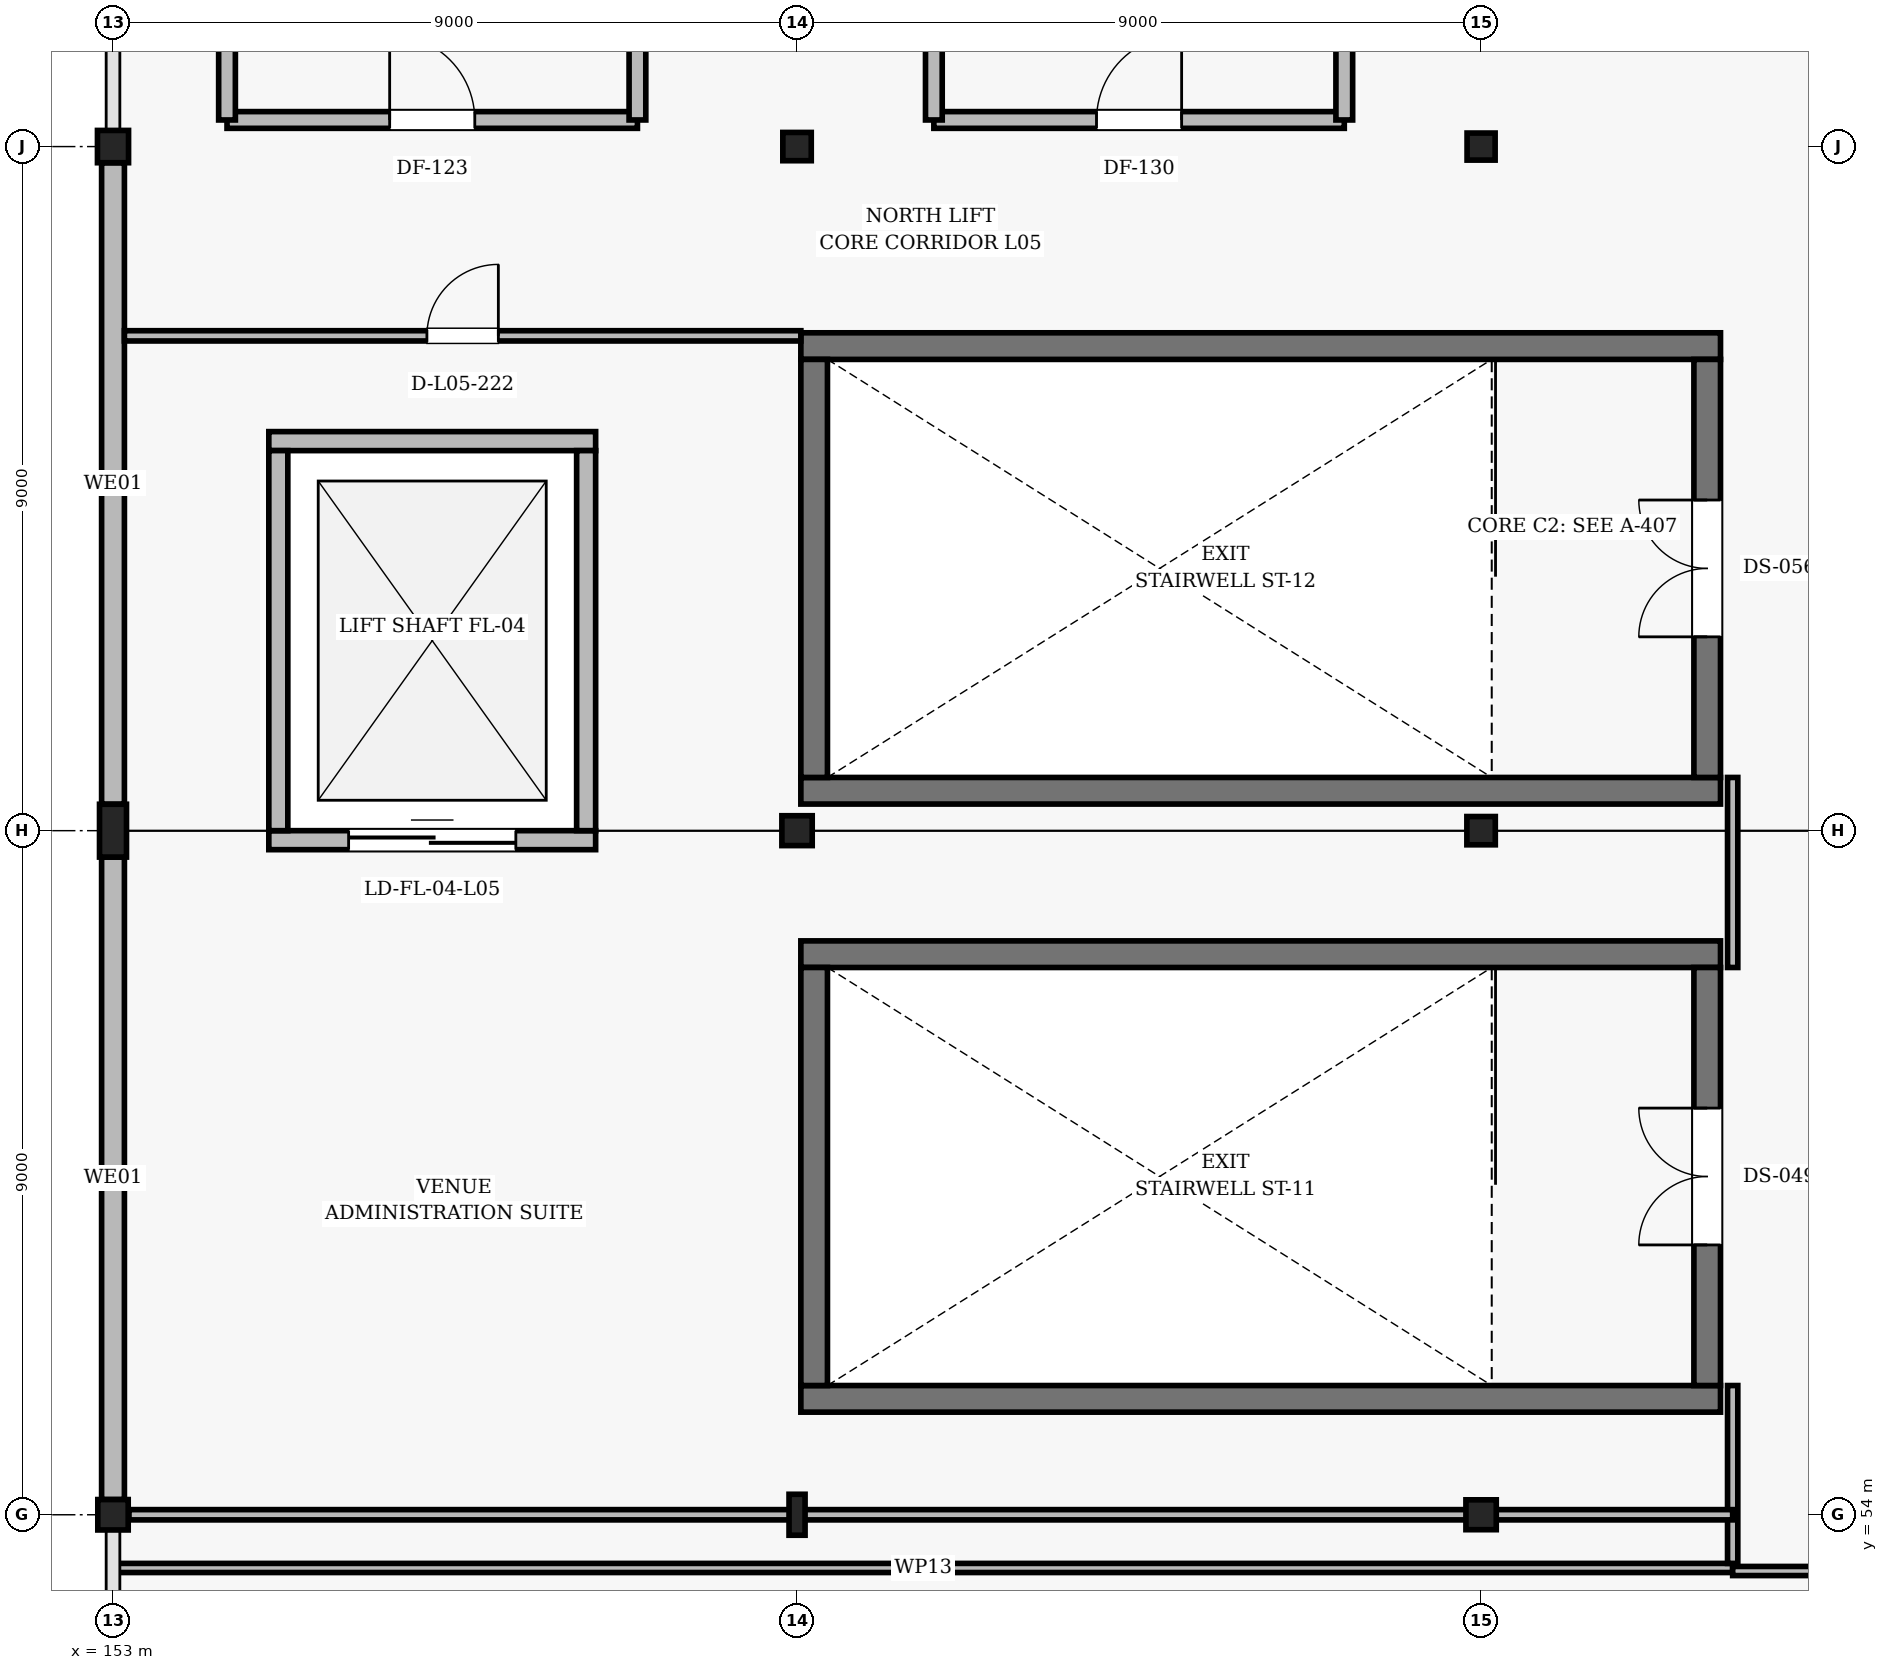
"""IFC4 building model, lengths in metres.
Left out: names, types, materials, properties, quantities, classifications, styles, units other than length and angle.
Written with IfcOpenShell. Run it as: python <this file> out.ifc"""

import sys

from ifc_helpers import new_model, si_unit, direction, frame, frame_2d, origin, origin_2d, place, context, subcontext, project, spatial, rectangle, hollow_rectangle, i_section, extrude, element, fill, save


model = new_model("IFC4")
c1 = context("Model", 3, precision=1e-05, world=origin(), true_north=direction((0.0, 1.0)))
c2 = subcontext(c1, "Body", "Model", "MODEL_VIEW")
j1 = project(units=[si_unit("LENGTHUNIT", "METRE"), si_unit("PLANEANGLEUNIT", "RADIAN")], contexts=[c1])
p1 = place(None, origin())
s1 = spatial("IfcSite", under=j1, at=p1, CompositionType="ELEMENT")
p2 = place(p1, origin())
s2 = spatial("IfcBuilding", under=s1, at=p2, CompositionType="ELEMENT")
p3 = place(p2, frame((0.0, 0.0, 25.2)))
s3 = spatial("IfcBuildingStorey", under=s2, at=p3, CompositionType="ELEMENT", Elevation=25.2)
p4 = place(p3, frame((153.0, 54.0, 0.0), z_axis=(0.0, 0.0, 1.0), x_axis=(1.0, 0.0, 0.0)))
e1 = element("IfcColumn", 1, at=p4, inside=s3, PredefinedType="COLUMN", context=c2, shape_type="SweptSolid", body=[
    extrude(hollow_rectangle(XDim=0.4, YDim=0.4, WallThickness=0.016, InnerFilletRadius=0.016, OuterFilletRadius=0.032, at=origin_2d()), origin(), (0.0, 0.0, 1.0), 4.8),
])
p5 = place(p3, frame((153.0, 63.0, 0.0), z_axis=(0.0, 0.0, 1.0), x_axis=(1.0, 0.0, 0.0)))
e2 = element("IfcColumn", 2, at=p5, inside=s3, PredefinedType="COLUMN", context=c2, shape_type="SweptSolid", body=[
    extrude(i_section(OverallWidth=0.355, OverallDepth=0.695, WebThickness=0.015, FlangeThickness=0.025, FilletRadius=0.018, at=origin_2d()), origin(), (0.0, 0.0, 1.0), 4.595),
])
p6 = place(p3, frame((153.0, 72.0, 0.0), z_axis=(0.0, 0.0, 1.0), x_axis=(1.0, 0.0, 0.0)))
e3 = element("IfcColumn", 3, at=p6, inside=s3, PredefinedType="COLUMN", context=c2, shape_type="SweptSolid", body=[
    extrude(i_section(OverallWidth=0.409, OverallDepth=0.425, WebThickness=0.031, FlangeThickness=0.049, FilletRadius=0.02, at=origin_2d()), origin(), (0.0, 0.0, 1.0), 4.595),
])
p7 = place(p3, frame((162.0, 54.0, 0.0), z_axis=(0.0, 0.0, 1.0), x_axis=(1.0, 0.0, 0.0)))
e4 = element("IfcColumn", 4, at=p7, inside=s3, PredefinedType="COLUMN", context=c2, shape_type="SweptSolid", body=[
    extrude(i_section(OverallWidth=0.211, OverallDepth=0.539, WebThickness=0.012, FlangeThickness=0.019, FilletRadius=0.014, at=origin_2d()), origin(), (0.0, 0.0, 1.0), 4.8),
])
p8 = place(p3, frame((162.0, 63.0, 0.0), z_axis=(0.0, 0.0, 1.0), x_axis=(1.0, 0.0, 0.0)))
e5 = element("IfcColumn", 5, at=p8, inside=s3, PredefinedType="COLUMN", context=c2, shape_type="SweptSolid", body=[
    extrude(i_section(OverallWidth=0.399, OverallDepth=0.393, WebThickness=0.023, FlangeThickness=0.037, FilletRadius=0.018, at=origin_2d()), origin(), (0.0, 0.0, 1.0), 4.595),
])
p9 = place(p3, frame((162.0, 72.0, 0.0), z_axis=(0.0, 0.0, 1.0), x_axis=(1.0, 0.0, 0.0)))
e6 = element("IfcColumn", 6, at=p9, inside=s3, PredefinedType="COLUMN", context=c2, shape_type="SweptSolid", body=[
    extrude(i_section(OverallWidth=0.374, OverallDepth=0.372, WebThickness=0.016, FlangeThickness=0.026, FilletRadius=0.016, at=origin_2d()), origin(), (0.0, 0.0, 1.0), 4.595),
])
p10 = place(p3, frame((171.0, 54.0, 0.0), z_axis=(0.0, 0.0, 1.0), x_axis=(1.0, 0.0, 0.0)))
e7 = element("IfcColumn", 7, at=p10, inside=s3, PredefinedType="COLUMN", context=c2, shape_type="SweptSolid", body=[
    extrude(i_section(OverallWidth=0.399, OverallDepth=0.393, WebThickness=0.023, FlangeThickness=0.037, FilletRadius=0.018, at=origin_2d()), origin(), (0.0, 0.0, 1.0), 4.8),
])
p11 = place(p3, frame((171.0, 63.0, 0.0), z_axis=(0.0, 0.0, 1.0), x_axis=(1.0, 0.0, 0.0)))
e8 = element("IfcColumn", 8, at=p11, inside=s3, PredefinedType="COLUMN", context=c2, shape_type="SweptSolid", body=[
    extrude(i_section(OverallWidth=0.374, OverallDepth=0.372, WebThickness=0.016, FlangeThickness=0.026, FilletRadius=0.016, at=origin_2d()), origin(), (0.0, 0.0, 1.0), 4.595),
])
p12 = place(p3, frame((171.0, 72.0, 0.0), z_axis=(0.0, 0.0, 1.0), x_axis=(1.0, 0.0, 0.0)))
e9 = element("IfcColumn", 9, at=p12, inside=s3, PredefinedType="COLUMN", context=c2, shape_type="SweptSolid", body=[
    extrude(i_section(OverallWidth=0.369, OverallDepth=0.356, WebThickness=0.011, FlangeThickness=0.018, FilletRadius=0.015, at=origin_2d()), origin(), (0.0, 0.0, 1.0), 4.595),
])
p13 = place(p3, frame((153.0, 54.2, 0.0), z_axis=(0.0, 0.0, 1.0), x_axis=(0.0, 1.0, 0.0)))
e10 = element("IfcWall", 10, at=p13, inside=s3, PredefinedType="SOLIDWALL", context=c2, shape_type="SweptSolid", body=[
    extrude(rectangle(XDim=8.453, YDim=0.3, at=frame_2d((4.226, 0.0))), origin(), (0.0, 0.0, 1.0), 4.09),
])
p14 = place(p3, frame((153.0, 63.347, 0.0), z_axis=(0.0, 0.0, 1.0), x_axis=(0.0, 1.0, 0.0)))
e11 = element("IfcWall", 11, at=p14, inside=s3, PredefinedType="SOLIDWALL", context=c2, shape_type="SweptSolid", body=[
    extrude(rectangle(XDim=8.44, YDim=0.3, at=frame_2d((4.22, 0.0))), origin(), (0.0, 0.0, 1.0), 3.896),
])
for number, where, z_axis, x_axis in (
    (12, (162.05, 55.525, 0.0), (0.0, 0.0, 1.0), (1.0, 0.0, 0.0)),
    (13, (174.15, 61.375, 0.0), (0.0, 0.0, 1.0), (-1.0, 0.0, 0.0)),
):
    element("IfcWall", number, at=place(p3, frame(where, z_axis=z_axis, x_axis=x_axis)), inside=s3, PredefinedType="SHEAR", context=c2, shape_type="SweptSolid", body=[
        extrude(rectangle(XDim=12.1, YDim=0.35, at=frame_2d((6.05, 0.0))), origin(), (0.0, 0.0, 1.0), 4.8),
    ])
p15 = place(p3, frame((162.225, 61.2, 0.0), z_axis=(0.0, 0.0, 1.0), x_axis=(0.0, -1.0, 0.0)))
e14 = element("IfcWall", 14, at=p15, inside=s3, PredefinedType="SHEAR", context=c2, shape_type="SweptSolid", body=[
    extrude(rectangle(XDim=5.5, YDim=0.35, at=frame_2d((2.75, 0.0))), origin(), (0.0, 0.0, 1.0), 4.8),
])
p16 = place(p3, frame((173.975, 55.7, 0.0), z_axis=(0.0, 0.0, 1.0), x_axis=(0.0, 1.0, 0.0)))
e15 = element("IfcWall", 15, at=p16, inside=s3, PredefinedType="SHEAR", context=c2, shape_type="SweptSolid", body=[
    extrude(rectangle(XDim=5.5, YDim=0.35, at=frame_2d((2.75, 0.0))), origin(), (0.0, 0.0, 1.0), 4.8),
])
p17 = place(p16, frame((1.85, 0.0, 0.0)))
e16 = element("IfcOpeningElement", 16, at=p17, cuts=e15, PredefinedType="OPENING", context=c2, shape_type="SweptSolid", body=[
    extrude(rectangle(XDim=1.8, YDim=2.2, at=frame_2d((0.9, 1.1))), frame((0.0, 0.185, 0.0), z_axis=(0.0, -1.0, 0.0), x_axis=(1.0, 0.0, 0.0)), (0.0, 0.0, 1.0), 0.37),
])
for number, where, z_axis, x_axis in (
    (17, (162.05, 63.525, 0.0), (0.0, 0.0, 1.0), (1.0, 0.0, 0.0)),
    (18, (174.15, 69.375, 0.0), (0.0, 0.0, 1.0), (-1.0, 0.0, 0.0)),
):
    element("IfcWall", number, at=place(p3, frame(where, z_axis=z_axis, x_axis=x_axis)), inside=s3, PredefinedType="SHEAR", context=c2, shape_type="SweptSolid", body=[
        extrude(rectangle(XDim=12.1, YDim=0.35, at=frame_2d((6.05, 0.0))), origin(), (0.0, 0.0, 1.0), 4.595),
    ])
p18 = place(p3, frame((162.225, 69.2, 0.0), z_axis=(0.0, 0.0, 1.0), x_axis=(0.0, -1.0, 0.0)))
e19 = element("IfcWall", 19, at=p18, inside=s3, PredefinedType="SHEAR", context=c2, shape_type="SweptSolid", body=[
    extrude(rectangle(XDim=5.5, YDim=0.35, at=frame_2d((2.75, 0.0))), origin(), (0.0, 0.0, 1.0), 4.595),
])
p19 = place(p3, frame((173.975, 63.7, 0.0), z_axis=(0.0, 0.0, 1.0), x_axis=(0.0, 1.0, 0.0)))
e20 = element("IfcWall", 20, at=p19, inside=s3, PredefinedType="SHEAR", context=c2, shape_type="SweptSolid", body=[
    extrude(rectangle(XDim=5.5, YDim=0.35, at=frame_2d((2.75, 0.0))), origin(), (0.0, 0.0, 1.0), 4.595),
])
p20 = place(p19, frame((1.85, 0.0, 0.0)))
e21 = element("IfcOpeningElement", 21, at=p20, cuts=e20, PredefinedType="OPENING", context=c2, shape_type="SweptSolid", body=[
    extrude(rectangle(XDim=1.8, YDim=2.2, at=frame_2d((0.9, 1.1))), frame((0.0, 0.185, 0.0), z_axis=(0.0, -1.0, 0.0), x_axis=(1.0, 0.0, 0.0)), (0.0, 0.0, 1.0), 0.37),
])
p21 = place(p3, frame((154.5, 72.35, 0.0), z_axis=(0.0, 0.0, 1.0), x_axis=(1.0, 0.0, 0.0)))
e22 = element("IfcWall", 22, at=p21, inside=s3, PredefinedType="SOLIDWALL", context=c2, shape_type="SweptSolid", body=[
    extrude(rectangle(XDim=5.4, YDim=0.22, at=frame_2d((2.7, 0.0))), origin(), (0.0, 0.0, 1.0), 3.807),
])
p22 = place(p21, frame((2.14, 0.0, 0.0)))
e23 = element("IfcOpeningElement", 23, at=p22, cuts=e22, PredefinedType="OPENING", context=c2, shape_type="SweptSolid", body=[
    extrude(rectangle(XDim=1.12, YDim=2.2, at=frame_2d((0.56, 1.1))), frame((0.0, 0.12, 0.0), z_axis=(0.0, -1.0, 0.0), x_axis=(1.0, 0.0, 0.0)), (0.0, 0.0, 1.0), 0.24),
])
for number, where, z_axis, x_axis in (
    (24, (154.5, 72.35, 0.0), (0.0, 0.0, 1.0), (0.0, 1.0, 0.0)),
    (25, (159.9, 72.35, 0.0), (0.0, 0.0, 1.0), (0.0, 1.0, 0.0)),
):
    element("IfcWall", number, at=place(p3, frame(where, z_axis=z_axis, x_axis=x_axis)), inside=s3, PredefinedType="SOLIDWALL", context=c2, shape_type="SweptSolid", body=[
        extrude(rectangle(XDim=3.05, YDim=0.22, at=frame_2d((1.525, 0.0))), origin(), (0.0, 0.0, 1.0), 3.807),
    ])
p23 = place(p3, frame((163.8, 72.35, 0.0), z_axis=(0.0, 0.0, 1.0), x_axis=(1.0, 0.0, 0.0)))
e26 = element("IfcWall", 26, at=p23, inside=s3, PredefinedType="SOLIDWALL", context=c2, shape_type="SweptSolid", body=[
    extrude(rectangle(XDim=5.4, YDim=0.22, at=frame_2d((2.7, 0.0))), origin(), (0.0, 0.0, 1.0), 3.885),
])
p24 = place(p23, frame((2.14, 0.0, 0.0)))
e27 = element("IfcOpeningElement", 27, at=p24, cuts=e26, PredefinedType="OPENING", context=c2, shape_type="SweptSolid", body=[
    extrude(rectangle(XDim=1.12, YDim=2.2, at=frame_2d((0.56, 1.1))), frame((0.0, 0.12, 0.0), z_axis=(0.0, -1.0, 0.0), x_axis=(1.0, 0.0, 0.0)), (0.0, 0.0, 1.0), 0.24),
])
for number, where, z_axis, x_axis in (
    (28, (163.8, 72.35, 0.0), (0.0, 0.0, 1.0), (0.0, 1.0, 0.0)),
    (29, (169.2, 72.35, 0.0), (0.0, 0.0, 1.0), (0.0, 1.0, 0.0)),
):
    element("IfcWall", number, at=place(p3, frame(where, z_axis=z_axis, x_axis=x_axis)), inside=s3, PredefinedType="SOLIDWALL", context=c2, shape_type="SweptSolid", body=[
        extrude(rectangle(XDim=3.05, YDim=0.22, at=frame_2d((1.525, 0.0))), origin(), (0.0, 0.0, 1.0), 3.885),
    ])
p25 = place(p3, frame((155.05, 62.875, 0.0), z_axis=(0.0, 0.0, 1.0), x_axis=(1.0, 0.0, 0.0)))
e30 = element("IfcWall", 30, at=p25, inside=s3, PredefinedType="SOLIDWALL", context=c2, shape_type="SweptSolid", body=[
    extrude(rectangle(XDim=4.3, YDim=0.25, at=frame_2d((2.15, 0.0))), origin(), (0.0, 0.0, 1.0), 3.794),
])
p26 = place(p25, frame((1.05, 0.0, 0.0)))
e31 = element("IfcOpeningElement", 31, at=p26, cuts=e30, PredefinedType="OPENING", context=c2, shape_type="SweptSolid", body=[
    extrude(rectangle(XDim=2.2, YDim=2.5, at=frame_2d((1.1, 1.25))), frame((0.0, 0.135, 0.0), z_axis=(0.0, -1.0, 0.0), x_axis=(1.0, 0.0, 0.0)), (0.0, 0.0, 1.0), 0.27),
])
p27 = place(p3, frame((159.35, 68.125, 0.0), z_axis=(0.0, 0.0, 1.0), x_axis=(-1.0, 0.0, 0.0)))
e32 = element("IfcWall", 32, at=p27, inside=s3, PredefinedType="SOLIDWALL", context=c2, shape_type="SweptSolid", body=[
    extrude(rectangle(XDim=4.3, YDim=0.25, at=frame_2d((2.15, 0.0))), origin(), (0.0, 0.0, 1.0), 4.6),
])
for number, where, z_axis, x_axis in (
    (33, (155.175, 68.0, 0.0), (0.0, 0.0, 1.0), (0.0, -1.0, 0.0)),
    (34, (159.225, 63.0, 0.0), (0.0, 0.0, 1.0), (0.0, 1.0, 0.0)),
):
    element("IfcWall", number, at=place(p3, frame(where, z_axis=z_axis, x_axis=x_axis)), inside=s3, PredefinedType="SOLIDWALL", context=c2, shape_type="SweptSolid", body=[
        extrude(rectangle(XDim=5.0, YDim=0.25, at=frame_2d((2.5, 0.0))), origin(), (0.0, 0.0, 1.0), 3.794),
    ])
p28 = place(p3, frame((153.012, 53.3, 0.0), z_axis=(0.0, 0.0, 1.0), x_axis=(1.0, 0.0, 0.0)))
e35 = element("IfcWall", 35, at=p28, inside=s3, PredefinedType="PARTITIONING", context=c2, shape_type="SweptSolid", body=[
    extrude(rectangle(XDim=21.298, YDim=0.12, at=frame_2d((10.649, 0.0))), origin(), (0.0, 0.0, 1.0), 3.93),
])
p29 = place(p3, frame((174.31, 53.26, 0.0), z_axis=(0.0, 0.0, 1.0), x_axis=(1.0, 0.0, 0.0)))
e36 = element("IfcWall", 36, at=p29, inside=s3, PredefinedType="PARTITIONING", context=c2, shape_type="SweptSolid", body=[
    extrude(rectangle(XDim=4.94, YDim=0.12, at=frame_2d((2.47, 0.0))), origin(), (0.0, 0.0, 1.0), 4.6),
])
p30 = place(p29, frame((1.99, 0.0, 0.0)))
e37 = element("IfcOpeningElement", 37, at=p30, cuts=e36, PredefinedType="OPENING", context=c2, shape_type="SweptSolid", body=[
    extrude(rectangle(XDim=0.96, YDim=2.15, at=frame_2d((0.48, 1.075))), frame((0.0, 0.07, 0.0), z_axis=(0.0, -1.0, 0.0), x_axis=(1.0, 0.0, 0.0)), (0.0, 0.0, 1.0), 0.14),
])
p31 = place(p3, frame((153.15, 69.51, 0.0), z_axis=(0.0, 0.0, 1.0), x_axis=(1.0, 0.0, 0.0)))
e38 = element("IfcWall", 38, at=p31, inside=s3, PredefinedType="PARTITIONING", context=c2, shape_type="SweptSolid", body=[
    extrude(rectangle(XDim=8.9, YDim=0.135, at=frame_2d((4.45, 0.0))), origin(), (0.0, 0.0, 1.0), 3.885),
])
p32 = place(p31, frame((3.98, 0.0, 0.0)))
e39 = element("IfcOpeningElement", 39, at=p32, cuts=e38, PredefinedType="OPENING", context=c2, shape_type="SweptSolid", body=[
    extrude(rectangle(XDim=0.94, YDim=2.15, at=frame_2d((0.47, 1.075))), frame((0.0, 0.078, 0.0), z_axis=(0.0, -1.0, 0.0), x_axis=(1.0, 0.0, 0.0)), (0.0, 0.0, 1.0), 0.155),
])
p33 = place(p3, frame((174.31, 63.7, 0.0), z_axis=(0.0, 0.0, 1.0), x_axis=(0.0, -1.0, 0.0)))
e40 = element("IfcWall", 40, at=p33, inside=s3, PredefinedType="PARTITIONING", context=c2, shape_type="SweptSolid", body=[
    extrude(rectangle(XDim=2.5, YDim=0.135, at=frame_2d((1.25, 0.0))), origin(), (0.0, 0.0, 1.0), 3.794),
])
p34 = place(p3, frame((174.31, 55.7, 0.0), z_axis=(0.0, 0.0, 1.0), x_axis=(0.0, -1.0, 0.0)))
e41 = element("IfcWall", 41, at=p34, inside=s3, PredefinedType="PARTITIONING", context=c2, shape_type="SweptSolid", body=[
    extrude(rectangle(XDim=2.34, YDim=0.135, at=frame_2d((1.17, 0.0))), origin(), (0.0, 0.0, 1.0), 3.794),
])
p35 = place(p3, frame((174.31, 54.0, 0.0), z_axis=(0.0, 0.0, 1.0), x_axis=(-1.0, 0.0, 0.0)))
e42 = element("IfcWall", 42, at=p35, inside=s3, PredefinedType="PARTITIONING", context=c2, shape_type="SweptSolid", body=[
    extrude(rectangle(XDim=21.1, YDim=0.135, at=frame_2d((10.55, 0.0))), origin(), (0.0, 0.0, 1.0), 3.794),
])
p36 = place(p17, origin())
e43 = element("IfcDoor", 43, at=p36, inside=s3, OperationType="DOUBLE_DOOR_SINGLE_SWING", PredefinedType="DOOR", context=c2, shape_type="SweptSolid", body=[
    extrude(rectangle(XDim=1.8, YDim=2.2, at=frame_2d((0.9, 1.1))), frame((0.0, 0.025, 0.0), z_axis=(0.0, -1.0, 0.0), x_axis=(1.0, 0.0, 0.0)), (0.0, 0.0, 1.0), 0.05),
])
fill(e16, e43)
p37 = place(p20, origin())
e44 = element("IfcDoor", 44, at=p37, inside=s3, OperationType="DOUBLE_DOOR_SINGLE_SWING", PredefinedType="DOOR", context=c2, shape_type="SweptSolid", body=[
    extrude(rectangle(XDim=1.8, YDim=2.2, at=frame_2d((0.9, 1.1))), frame((0.0, 0.025, 0.0), z_axis=(0.0, -1.0, 0.0), x_axis=(1.0, 0.0, 0.0)), (0.0, 0.0, 1.0), 0.05),
])
fill(e21, e44)
p38 = place(p22, origin())
e45 = element("IfcDoor", 45, at=p38, inside=s3, OperationType="SINGLE_SWING_LEFT", PredefinedType="DOOR", context=c2, shape_type="SweptSolid", body=[
    extrude(rectangle(XDim=1.12, YDim=2.2, at=frame_2d((0.56, 1.1))), frame((0.0, 0.025, 0.0), z_axis=(0.0, -1.0, 0.0), x_axis=(1.0, 0.0, 0.0)), (0.0, 0.0, 1.0), 0.05),
])
fill(e23, e45)
p39 = place(p24, origin())
e46 = element("IfcDoor", 46, at=p39, inside=s3, OperationType="SINGLE_SWING_RIGHT", PredefinedType="DOOR", context=c2, shape_type="SweptSolid", body=[
    extrude(rectangle(XDim=1.12, YDim=2.2, at=frame_2d((0.56, 1.1))), frame((0.0, 0.025, 0.0), z_axis=(0.0, -1.0, 0.0), x_axis=(1.0, 0.0, 0.0)), (0.0, 0.0, 1.0), 0.05),
])
fill(e27, e46)
p40 = place(p26, origin())
e47 = element("IfcDoor", 47, at=p40, inside=s3, OperationType="DOUBLE_DOOR_SLIDING", PredefinedType="DOOR", context=c2, shape_type="SweptSolid", body=[
    extrude(rectangle(XDim=2.2, YDim=2.5, at=frame_2d((1.1, 1.25))), frame((0.0, 0.025, 0.0), z_axis=(0.0, -1.0, 0.0), x_axis=(1.0, 0.0, 0.0)), (0.0, 0.0, 1.0), 0.05),
])
fill(e31, e47)
p41 = place(p32, origin())
e48 = element("IfcDoor", 48, at=p41, inside=s3, OperationType="SINGLE_SWING_RIGHT", PredefinedType="DOOR", context=c2, shape_type="SweptSolid", body=[
    extrude(rectangle(XDim=0.94, YDim=2.15, at=frame_2d((0.47, 1.075))), frame((0.0, 0.025, 0.0), z_axis=(0.0, -1.0, 0.0), x_axis=(1.0, 0.0, 0.0)), (0.0, 0.0, 1.0), 0.05),
])
fill(e39, e48)
save(model, sys.argv[1])
